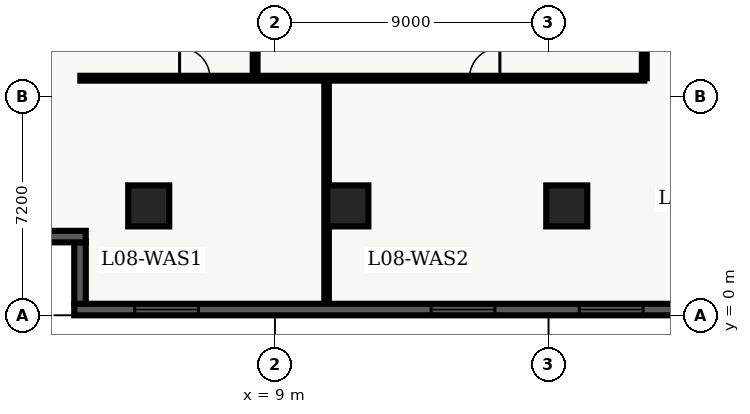
"""IFC4 building model, lengths in metres.
Left out: names, types, materials, properties, quantities, classifications, styles, units other than length and angle.
Written with IfcOpenShell. Run it as: python <this file> out.ifc"""

import sys

from ifc_helpers import new_model, entity, si_unit, converted_unit, direction, frame, origin_with_axes, origin_2d_with_axis, place, context, subcontext, project, spatial, polyline, rectangle, outline, extrude, element, fill, save


model = new_model("IFC4")
c1 = context("Model", 3, precision=1e-05, world=origin_with_axes(), true_north=direction((0.0, 1.0)))
c2 = subcontext(c1, "Body", "Model", "MODEL_VIEW")
j1 = project(units=[si_unit("LENGTHUNIT", "METRE"), converted_unit("PLANEANGLEUNIT", "DEGREE", entity("IfcPlaneAngleMeasure", 0.017), si_unit("PLANEANGLEUNIT", "RADIAN"), dimensions=[0, 0, 0, 0, 0, 0, 0])], contexts=[c1])
p1 = place(None, origin_with_axes())
s1 = spatial("IfcSite", under=j1, at=p1, CompositionType="ELEMENT")
p2 = place(p1, origin_with_axes())
s2 = spatial("IfcBuilding", under=s1, at=p2, CompositionType="ELEMENT")
p3 = place(p2, frame((0.0, 0.0, 36.6), z_axis=(0.0, 0.0, 1.0), x_axis=(1.0, 0.0, 0.0)))
s3 = spatial("IfcBuildingStorey", under=s2, at=p3, CompositionType="ELEMENT", Elevation=36.6)
for number, where, z_axis, x_axis in (
    (1, (11.4, 3.6, 0.0), (0.0, 0.0, 1.0), (1.0, 0.0, 0.0)),
    (2, (18.6, 3.6, 0.0), (0.0, 0.0, 1.0), (1.0, 0.0, 0.0)),
    (3, (4.85, 3.6, 0.0), (0.0, 0.0, 1.0), (1.0, 0.0, 0.0)),
):
    element("IfcColumn", number, at=place(p3, frame(where, z_axis=z_axis, x_axis=x_axis)), inside=s3, PredefinedType="COLUMN", context=c2, shape_type="SweptSolid", body=[
        extrude(rectangle(XDim=1.35, YDim=1.35, at=origin_2d_with_axis()), origin_with_axes(), (0.0, 0.0, 1.0), 3.9),
    ])
p4 = place(p3, frame((2.6, 7.8, 0.0), z_axis=(0.0, 0.0, 1.0), x_axis=(1.0, 0.0, 0.0)))
e4 = element("IfcWall", 4, at=p4, inside=s3, PredefinedType="PARTITIONING", context=c2, shape_type="SweptSolid", body=[
    extrude(outline(polyline([(0.0, -0.08), (18.55, -0.08), (18.55, 0.08), (0.0, 0.08), (0.0, -0.08)])), origin_with_axes(), (0.0, 0.0, 1.0), 2.7),
])
p5 = place(p4, frame((3.765, 0.0, 0.0), z_axis=(0.0, 0.0, 1.0), x_axis=(1.0, 0.0, 0.0)))
e5 = element("IfcOpeningElement", 5, at=p5, cuts=e4, PredefinedType="OPENING", context=c2, shape_type="SweptSolid", body=[
    extrude(rectangle(XDim=1.0, YDim=0.18, at=origin_2d_with_axis()), origin_with_axes(), (0.0, 0.0, 1.0), 2.15),
])
p6 = place(p4, frame((13.3, 0.0, 0.0), z_axis=(0.0, 0.0, 1.0), x_axis=(1.0, 0.0, 0.0)))
e6 = element("IfcOpeningElement", 6, at=p6, cuts=e4, PredefinedType="OPENING", context=c2, shape_type="SweptSolid", body=[
    extrude(rectangle(XDim=1.0, YDim=0.18, at=origin_2d_with_axis()), origin_with_axes(), (0.0, 0.0, 1.0), 2.15),
])
p7 = place(p3, frame((21.15, 7.8, 0.0), z_axis=(0.0, 0.0, 1.0), x_axis=(0.0, 1.0, 0.0)))
e7 = element("IfcWall", 7, at=p7, inside=s3, PredefinedType="PARTITIONING", context=c2, shape_type="SweptSolid", body=[
    extrude(outline(polyline([(0.0, -0.08), (32.7, -0.08), (32.7, 0.08), (0.0, 0.08), (0.0, -0.08)])), origin_with_axes(), (0.0, 0.0, 1.0), 2.7),
])
p8 = place(p7, frame((5.775, 0.0, 0.0), z_axis=(0.0, 0.0, 1.0), x_axis=(1.0, 0.0, 0.0)))
e8 = element("IfcOpeningElement", 8, at=p8, cuts=e7, PredefinedType="OPENING", context=c2, shape_type="SweptSolid", body=[
    extrude(rectangle(XDim=1.05, YDim=0.18, at=origin_2d_with_axis()), origin_with_axes(), (0.0, 0.0, 1.0), 2.15),
])
p9 = place(p3, frame((8.35, 7.8, 0.0), z_axis=(0.0, 0.0, 1.0), x_axis=(0.0, 1.0, 0.0)))
e9 = element("IfcWall", 9, at=p9, inside=s3, PredefinedType="PARTITIONING", context=c2, shape_type="SweptSolid", body=[
    extrude(outline(polyline([(0.0, -0.08), (12.6, -0.08), (12.6, 0.08), (0.0, 0.08), (0.0, -0.08)])), origin_with_axes(), (0.0, 0.0, 1.0), 2.7),
])
p10 = place(p9, frame((6.325, 0.0, 0.0), z_axis=(0.0, 0.0, 1.0), x_axis=(1.0, 0.0, 0.0)))
e10 = element("IfcOpeningElement", 10, at=p10, cuts=e9, PredefinedType="OPENING", context=c2, shape_type="SweptSolid", body=[
    extrude(rectangle(XDim=1.0, YDim=0.18, at=origin_2d_with_axis()), origin_with_axes(), (0.0, 0.0, 1.0), 2.15),
])
p11 = place(p3, frame((10.7, 0.36, 0.0), z_axis=(0.0, 0.0, 1.0), x_axis=(0.0, 1.0, 0.0)))
e11 = element("IfcWall", 11, at=p11, inside=s3, PredefinedType="PARTITIONING", context=c2, shape_type="SweptSolid", body=[
    extrude(outline(polyline([(0.0, -0.075), (7.34, -0.075), (7.34, 0.075), (0.0, 0.075), (0.0, -0.075)])), origin_with_axes(), (0.0, 0.0, 1.0), 2.7),
])
p12 = place(p3, frame((57.22, 0.19, 0.0), z_axis=(0.0, 0.0, 1.0), x_axis=(-1.0, 0.0, 0.0)))
e12 = element("IfcWall", 12, at=p12, inside=s3, PredefinedType="SOLIDWALL", context=c2, shape_type="SweptSolid", body=[
    extrude(outline(polyline([(0.0, -0.19), (54.82, -0.19), (54.82, 0.19), (0.0, 0.19), (0.0, -0.19)])), origin_with_axes(), (0.0, 0.0, 1.0), 3.66),
])
p13 = place(p12, frame((3.037, 0.0, 0.45), z_axis=(0.0, 0.0, 1.0), x_axis=(1.0, 0.0, 0.0)))
e13 = element("IfcOpeningElement", 13, at=p13, cuts=e12, PredefinedType="OPENING", context=c2, shape_type="SweptSolid", body=[
    extrude(rectangle(XDim=2.1, YDim=0.4, at=origin_2d_with_axis()), origin_with_axes(), (0.0, 0.0, 1.0), 2.2),
])
p14 = place(p12, frame((7.912, 0.0, 0.45), z_axis=(0.0, 0.0, 1.0), x_axis=(1.0, 0.0, 0.0)))
e14 = element("IfcOpeningElement", 14, at=p14, cuts=e12, PredefinedType="OPENING", context=c2, shape_type="SweptSolid", body=[
    extrude(rectangle(XDim=2.1, YDim=0.4, at=origin_2d_with_axis()), origin_with_axes(), (0.0, 0.0, 1.0), 2.2),
])
p15 = place(p12, frame((12.786, 0.0, 0.45), z_axis=(0.0, 0.0, 1.0), x_axis=(1.0, 0.0, 0.0)))
e15 = element("IfcOpeningElement", 15, at=p15, cuts=e12, PredefinedType="OPENING", context=c2, shape_type="SweptSolid", body=[
    extrude(rectangle(XDim=2.1, YDim=0.4, at=origin_2d_with_axis()), origin_with_axes(), (0.0, 0.0, 1.0), 2.2),
])
p16 = place(p12, frame((17.661, 0.0, 0.45), z_axis=(0.0, 0.0, 1.0), x_axis=(1.0, 0.0, 0.0)))
e16 = element("IfcOpeningElement", 16, at=p16, cuts=e12, PredefinedType="OPENING", context=c2, shape_type="SweptSolid", body=[
    extrude(rectangle(XDim=2.1, YDim=0.4, at=origin_2d_with_axis()), origin_with_axes(), (0.0, 0.0, 1.0), 2.2),
])
p17 = place(p12, frame((22.535, 0.0, 0.45), z_axis=(0.0, 0.0, 1.0), x_axis=(1.0, 0.0, 0.0)))
e17 = element("IfcOpeningElement", 17, at=p17, cuts=e12, PredefinedType="OPENING", context=c2, shape_type="SweptSolid", body=[
    extrude(rectangle(XDim=2.1, YDim=0.4, at=origin_2d_with_axis()), origin_with_axes(), (0.0, 0.0, 1.0), 2.2),
])
p18 = place(p12, frame((27.41, 0.0, 0.45), z_axis=(0.0, 0.0, 1.0), x_axis=(1.0, 0.0, 0.0)))
e18 = element("IfcOpeningElement", 18, at=p18, cuts=e12, PredefinedType="OPENING", context=c2, shape_type="SweptSolid", body=[
    extrude(rectangle(XDim=2.1, YDim=0.4, at=origin_2d_with_axis()), origin_with_axes(), (0.0, 0.0, 1.0), 2.2),
])
p19 = place(p12, frame((32.285, 0.0, 0.45), z_axis=(0.0, 0.0, 1.0), x_axis=(1.0, 0.0, 0.0)))
e19 = element("IfcOpeningElement", 19, at=p19, cuts=e12, PredefinedType="OPENING", context=c2, shape_type="SweptSolid", body=[
    extrude(rectangle(XDim=2.1, YDim=0.4, at=origin_2d_with_axis()), origin_with_axes(), (0.0, 0.0, 1.0), 2.2),
])
p20 = place(p12, frame((37.159, 0.0, 0.45), z_axis=(0.0, 0.0, 1.0), x_axis=(1.0, 0.0, 0.0)))
e20 = element("IfcOpeningElement", 20, at=p20, cuts=e12, PredefinedType="OPENING", context=c2, shape_type="SweptSolid", body=[
    extrude(rectangle(XDim=2.1, YDim=0.4, at=origin_2d_with_axis()), origin_with_axes(), (0.0, 0.0, 1.0), 2.2),
])
p21 = place(p12, frame((42.034, 0.0, 0.45), z_axis=(0.0, 0.0, 1.0), x_axis=(1.0, 0.0, 0.0)))
e21 = element("IfcOpeningElement", 21, at=p21, cuts=e12, PredefinedType="OPENING", context=c2, shape_type="SweptSolid", body=[
    extrude(rectangle(XDim=2.1, YDim=0.4, at=origin_2d_with_axis()), origin_with_axes(), (0.0, 0.0, 1.0), 2.2),
])
p22 = place(p12, frame((51.783, 0.0, 0.45), z_axis=(0.0, 0.0, 1.0), x_axis=(1.0, 0.0, 0.0)))
e22 = element("IfcOpeningElement", 22, at=p22, cuts=e12, PredefinedType="OPENING", context=c2, shape_type="SweptSolid", body=[
    extrude(rectangle(XDim=2.1, YDim=0.4, at=origin_2d_with_axis()), origin_with_axes(), (0.0, 0.0, 1.0), 2.2),
])
p23 = place(p3, frame((2.59, 0.38, 0.0), z_axis=(0.0, 0.0, 1.0), x_axis=(0.0, 1.0, 0.0)))
e23 = element("IfcWall", 23, at=p23, inside=s3, PredefinedType="SOLIDWALL", context=c2, shape_type="SweptSolid", body=[
    extrude(outline(polyline([(0.0, -0.19), (2.02, -0.19), (2.02, 0.19), (0.0, 0.19), (0.0, -0.19)])), origin_with_axes(), (0.0, 0.0, 1.0), 3.66),
])
p24 = place(p3, frame((2.78, 2.59, 0.0), z_axis=(0.0, 0.0, 1.0), x_axis=(-1.0, 0.0, 0.0)))
e24 = element("IfcWall", 24, at=p24, inside=s3, PredefinedType="SOLIDWALL", context=c2, shape_type="SweptSolid", body=[
    extrude(outline(polyline([(0.0, -0.19), (2.78, -0.19), (2.78, 0.19), (0.0, 0.19), (0.0, -0.19)])), origin_with_axes(), (0.0, 0.0, 1.0), 3.66),
])
p25 = place(p4, frame((3.765, 0.0, 0.0), z_axis=(0.0, 0.0, 1.0), x_axis=(1.0, 0.0, 0.0)))
e25 = element("IfcDoor", 25, at=p25, inside=s3, OperationType="SINGLE_SWING_LEFT", PredefinedType="DOOR", context=c2, shape_type="SweptSolid", body=[
    extrude(rectangle(XDim=1.0, YDim=0.09, at=origin_2d_with_axis()), origin_with_axes(), (0.0, 0.0, 1.0), 2.15),
])
fill(e5, e25)
p26 = place(p4, frame((13.3, 0.0, 0.0), z_axis=(0.0, 0.0, 1.0), x_axis=(1.0, 0.0, 0.0)))
e26 = element("IfcDoor", 26, at=p26, inside=s3, OperationType="SINGLE_SWING_RIGHT", PredefinedType="DOOR", context=c2, shape_type="SweptSolid", body=[
    extrude(rectangle(XDim=1.0, YDim=0.09, at=origin_2d_with_axis()), origin_with_axes(), (0.0, 0.0, 1.0), 2.15),
])
fill(e6, e26)
p27 = place(p12, frame((37.159, 0.0, 0.45), z_axis=(0.0, 0.0, 1.0), x_axis=(1.0, 0.0, 0.0)))
e27 = element("IfcWindow", 27, at=p27, inside=s3, PredefinedType="WINDOW", context=c2, shape_type="SweptSolid", body=[
    extrude(rectangle(XDim=2.1, YDim=0.09, at=origin_2d_with_axis()), origin_with_axes(), (0.0, 0.0, 1.0), 2.2),
])
fill(e20, e27)
p28 = place(p12, frame((42.034, 0.0, 0.45), z_axis=(0.0, 0.0, 1.0), x_axis=(1.0, 0.0, 0.0)))
e28 = element("IfcWindow", 28, at=p28, inside=s3, PredefinedType="WINDOW", context=c2, shape_type="SweptSolid", body=[
    extrude(rectangle(XDim=2.1, YDim=0.09, at=origin_2d_with_axis()), origin_with_axes(), (0.0, 0.0, 1.0), 2.2),
])
fill(e21, e28)
p29 = place(p12, frame((51.783, 0.0, 0.45), z_axis=(0.0, 0.0, 1.0), x_axis=(1.0, 0.0, 0.0)))
e29 = element("IfcWindow", 29, at=p29, inside=s3, PredefinedType="WINDOW", context=c2, shape_type="SweptSolid", body=[
    extrude(rectangle(XDim=2.1, YDim=0.09, at=origin_2d_with_axis()), origin_with_axes(), (0.0, 0.0, 1.0), 2.2),
])
fill(e22, e29)
save(model, sys.argv[1])
